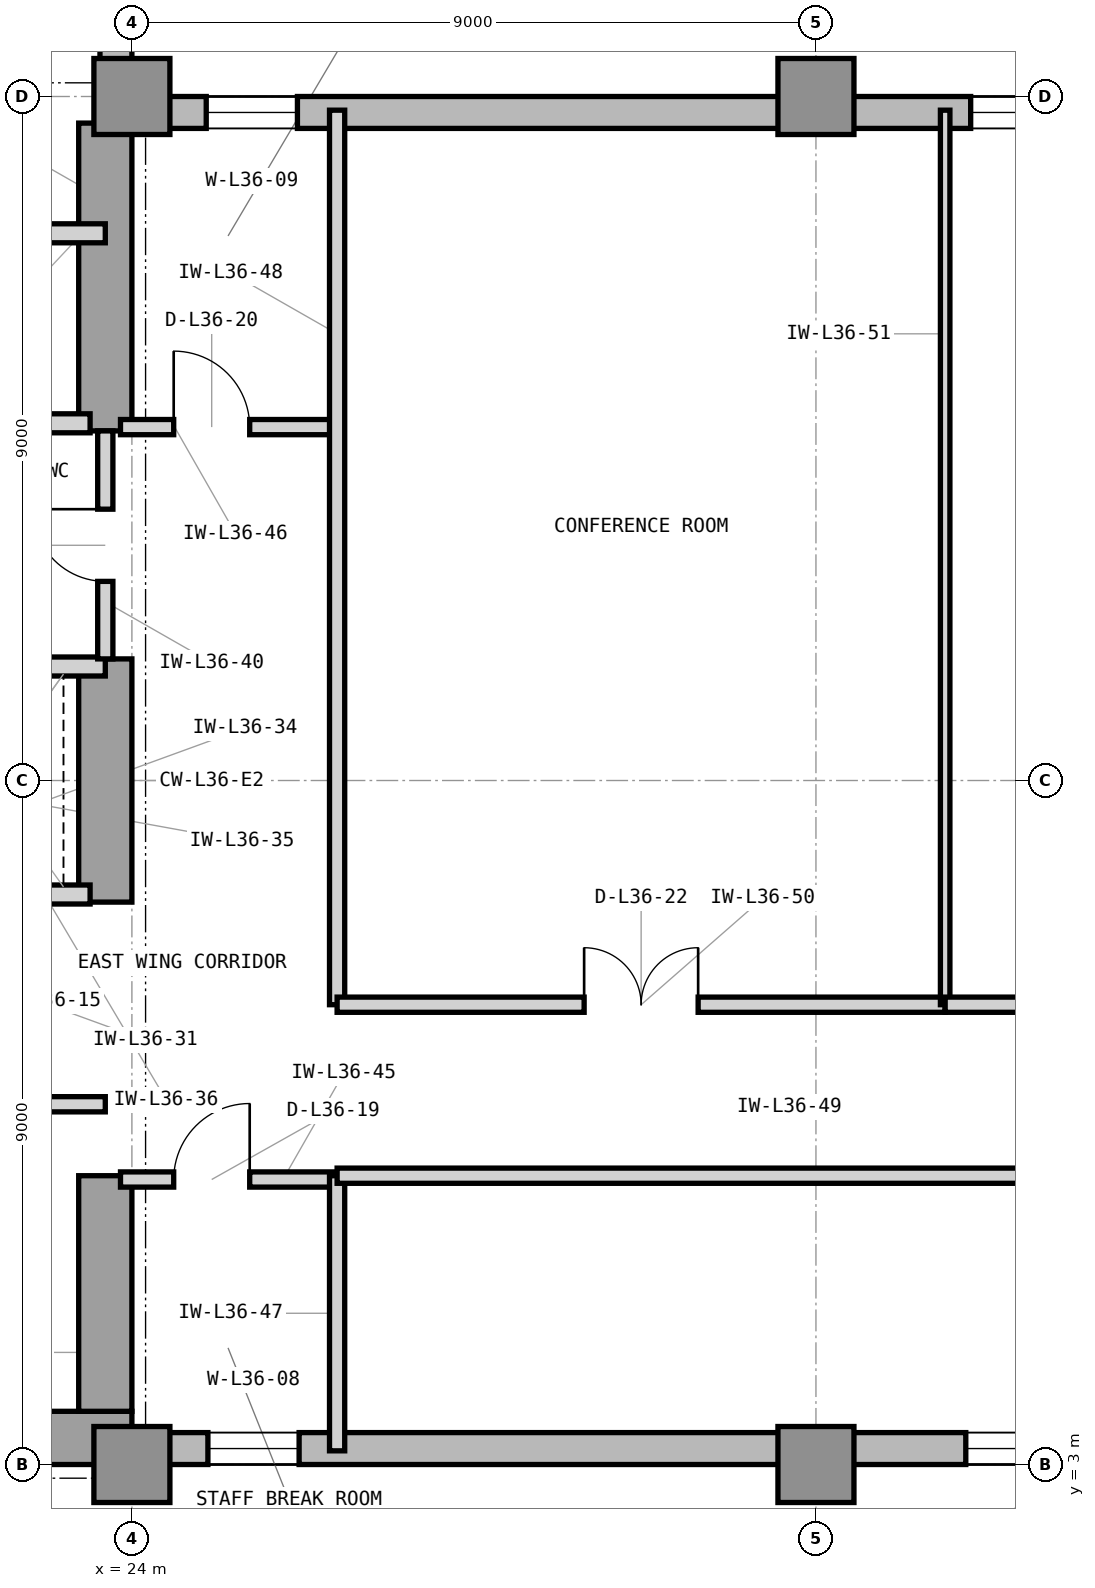
"""IFC4 building model, lengths in metres.
Left out: names, types, materials, properties, quantities, classifications, styles, units other than length and angle.
Written with IfcOpenShell. Run it as: python <this file> out.ifc"""

import sys

from ifc_helpers import new_model, si_unit, direction, frame, frame_2d, origin, origin_2d, place, context, subcontext, project, spatial, rectangle, extrude, element, fill, save


model = new_model("IFC4")
c1 = context("Model", 3, precision=1e-05, world=origin(), true_north=direction((0.0, 1.0)))
c2 = subcontext(c1, "Body", "Model", "MODEL_VIEW")
j1 = project(units=[si_unit("LENGTHUNIT", "METRE"), si_unit("PLANEANGLEUNIT", "RADIAN")], contexts=[c1])
p1 = place(None, origin())
s1 = spatial("IfcSite", under=j1, at=p1, CompositionType="ELEMENT")
p2 = place(p1, origin())
s2 = spatial("IfcBuilding", under=s1, at=p2, CompositionType="ELEMENT")
p3 = place(p2, frame((0.0, 0.0, 151.8)))
s3 = spatial("IfcBuildingStorey", under=s2, at=p3, CompositionType="ELEMENT", Elevation=151.8)
p4 = place(p3, frame((7.475, 3.35, 0.0), z_axis=(0.0, 0.0, 1.0), x_axis=(1.0, 0.0, 0.0)))
e1 = element("IfcWall", 1, at=p4, inside=s3, PredefinedType="SHEAR", context=c2, shape_type="SweptSolid", body=[
    extrude(rectangle(XDim=16.525, YDim=0.7, at=frame_2d((8.262, 0.0))), origin(), (0.0, 0.0, 1.0), 3.9),
])
p5 = place(p3, frame((23.65, 3.7, 0.0), z_axis=(0.0, 0.0, 1.0), x_axis=(0.0, 1.0, 0.0)))
e2 = element("IfcWall", 2, at=p5, inside=s3, PredefinedType="SHEAR", context=c2, shape_type="SweptSolid", body=[
    extrude(rectangle(XDim=3.1, YDim=0.7, at=frame_2d((1.55, 0.0))), origin(), (0.0, 0.0, 1.0), 3.9),
])
p6 = place(p3, frame((23.65, 10.4, 0.0), z_axis=(0.0, 0.0, 1.0), x_axis=(0.0, 1.0, 0.0)))
e3 = element("IfcWall", 3, at=p6, inside=s3, PredefinedType="SHEAR", context=c2, shape_type="SweptSolid", body=[
    extrude(rectangle(XDim=3.2, YDim=0.7, at=frame_2d((1.6, 0.0))), origin(), (0.0, 0.0, 1.0), 3.9),
])
p7 = place(p3, frame((23.65, 16.6, 0.0), z_axis=(0.0, 0.0, 1.0), x_axis=(0.0, 1.0, 0.0)))
e4 = element("IfcWall", 4, at=p7, inside=s3, PredefinedType="SHEAR", context=c2, shape_type="SweptSolid", body=[
    extrude(rectangle(XDim=4.05, YDim=0.7, at=frame_2d((2.025, 0.0))), origin(), (0.0, 0.0, 1.0), 3.9),
])
for number, where, z_axis, x_axis in (
    (5, (24.0, 3.0, 0.0), (0.0, 0.0, 1.0), (1.0, 0.0, 0.0)),
    (6, (24.0, 21.0, 0.0), (0.0, 0.0, 1.0), (1.0, 0.0, 0.0)),
    (7, (33.0, 3.0, 0.0), (0.0, 0.0, 1.0), (1.0, 0.0, 0.0)),
    (8, (33.0, 21.0, 0.0), (0.0, 0.0, 1.0), (1.0, 0.0, 0.0)),
):
    element("IfcColumn", number, at=place(p3, frame(where, z_axis=z_axis, x_axis=x_axis)), inside=s3, PredefinedType="COLUMN", context=c2, shape_type="SweptSolid", body=[
        extrude(rectangle(XDim=1.0, YDim=1.0, at=origin_2d()), origin(), (0.0, 0.0, 1.0), 3.9),
    ])
p8 = place(p3, frame((23.9, 3.21, 0.0), z_axis=(0.0, 0.0, 1.0), x_axis=(1.0, 0.0, 0.0)))
e9 = element("IfcWall", 9, at=p8, inside=s3, PredefinedType="STANDARD", context=c2, shape_type="SweptSolid", body=[
    extrude(rectangle(XDim=34.5, YDim=0.42, at=frame_2d((17.25, 0.0))), origin(), (0.0, 0.0, 1.0), 3.62),
])
p9 = place(p8, frame((11.071, 0.0, 0.85)))
e10 = element("IfcOpeningElement", 10, at=p9, cuts=e9, PredefinedType="OPENING", context=c2, shape_type="SweptSolid", body=[
    extrude(rectangle(XDim=2.5, YDim=2.25, at=frame_2d((1.25, 1.125))), frame((0.0, 0.22, 0.0), z_axis=(0.0, -1.0, 0.0), x_axis=(1.0, 0.0, 0.0)), (0.0, 0.0, 1.0), 0.44),
])
p10 = place(p8, frame((1.1, 0.0, 0.85)))
e11 = element("IfcOpeningElement", 11, at=p10, cuts=e9, PredefinedType="OPENING", context=c2, shape_type="SweptSolid", body=[
    extrude(rectangle(XDim=1.2, YDim=2.25, at=frame_2d((0.6, 1.125))), frame((0.0, 0.22, 0.0), z_axis=(0.0, -1.0, 0.0), x_axis=(1.0, 0.0, 0.0)), (0.0, 0.0, 1.0), 0.44),
])
p11 = place(p3, frame((58.4, 20.79, 0.0), z_axis=(0.0, 0.0, 1.0), x_axis=(-1.0, 0.0, 0.0)))
e12 = element("IfcWall", 12, at=p11, inside=s3, PredefinedType="STANDARD", context=c2, shape_type="SweptSolid", body=[
    extrude(rectangle(XDim=34.4, YDim=0.42, at=frame_2d((17.2, 0.0))), origin(), (0.0, 0.0, 1.0), 3.62),
])
p12 = place(p11, frame((20.864, 0.0, 0.85)))
e13 = element("IfcOpeningElement", 13, at=p12, cuts=e12, PredefinedType="OPENING", context=c2, shape_type="SweptSolid", body=[
    extrude(rectangle(XDim=2.5, YDim=2.25, at=frame_2d((1.25, 1.125))), frame((0.0, 0.22, 0.0), z_axis=(0.0, -1.0, 0.0), x_axis=(1.0, 0.0, 0.0)), (0.0, 0.0, 1.0), 0.44),
])
p13 = place(p11, frame((32.222, 0.0, 0.85)))
e14 = element("IfcOpeningElement", 14, at=p13, cuts=e12, PredefinedType="OPENING", context=c2, shape_type="SweptSolid", body=[
    extrude(rectangle(XDim=1.2, YDim=2.25, at=frame_2d((0.6, 1.125))), frame((0.0, 0.22, 0.0), z_axis=(0.0, -1.0, 0.0), x_axis=(1.0, 0.0, 0.0)), (0.0, 0.0, 1.0), 0.44),
])
p14 = place(p11, frame((11.386, 0.0, 0.85)))
e15 = element("IfcOpeningElement", 15, at=p14, cuts=e12, PredefinedType="OPENING", context=c2, shape_type="SweptSolid", body=[
    extrude(rectangle(XDim=2.5, YDim=2.25, at=frame_2d((1.25, 1.125))), frame((0.0, 0.22, 0.0), z_axis=(0.0, -1.0, 0.0), x_axis=(1.0, 0.0, 0.0)), (0.0, 0.0, 1.0), 0.44),
])
p15 = place(p3, frame((23.79, 21.0, 0.0), z_axis=(0.0, 0.0, 1.0), x_axis=(0.0, 1.0, 0.0)))
e16 = element("IfcWall", 16, at=p15, inside=s3, PredefinedType="STANDARD", context=c2, shape_type="SweptSolid", body=[
    extrude(rectangle(XDim=25.4, YDim=0.42, at=frame_2d((12.7, 0.0))), origin(), (0.0, 0.0, 1.0), 3.62),
])
p16 = place(p15, frame((11.45, 0.0, 0.85)))
e17 = element("IfcOpeningElement", 17, at=p16, cuts=e16, PredefinedType="OPENING", context=c2, shape_type="SweptSolid", body=[
    extrude(rectangle(XDim=2.5, YDim=2.25, at=frame_2d((1.25, 1.125))), frame((0.0, 0.22, 0.0), z_axis=(0.0, -1.0, 0.0), x_axis=(1.0, 0.0, 0.0)), (0.0, 0.0, 1.0), 0.44),
])
p17 = place(p15, frame((15.966, 0.0, 0.85)))
e18 = element("IfcOpeningElement", 18, at=p17, cuts=e16, PredefinedType="OPENING", context=c2, shape_type="SweptSolid", body=[
    extrude(rectangle(XDim=1.2, YDim=2.25, at=frame_2d((0.6, 1.125))), frame((0.0, 0.22, 0.0), z_axis=(0.0, -1.0, 0.0), x_axis=(1.0, 0.0, 0.0)), (0.0, 0.0, 1.0), 0.44),
])
p18 = place(p3, frame((21.05, 16.7, 0.0), z_axis=(0.0, 0.0, 1.0), x_axis=(1.0, 0.0, 0.0)))
e19 = element("IfcWall", 19, at=p18, inside=s3, PredefinedType="PARTITIONING", context=c2, shape_type="SweptSolid", body=[
    extrude(rectangle(XDim=2.4, YDim=0.25, at=frame_2d((1.2, 0.0))), origin(), (0.0, 0.0, 1.0), 3.066),
])
p19 = place(p3, frame((16.45, 19.2, 0.0), z_axis=(0.0, 0.0, 1.0), x_axis=(1.0, 0.0, 0.0)))
e20 = element("IfcWall", 20, at=p19, inside=s3, PredefinedType="PARTITIONING", context=c2, shape_type="SweptSolid", body=[
    extrude(rectangle(XDim=7.2, YDim=0.25, at=frame_2d((3.6, 0.0))), origin(), (0.0, 0.0, 1.0), 3.61),
])
p20 = place(p3, frame((17.5, 7.74, 0.0), z_axis=(0.0, 0.0, 1.0), x_axis=(1.0, 0.0, 0.0)))
e21 = element("IfcWall", 21, at=p20, inside=s3, PredefinedType="PARTITIONING", context=c2, shape_type="SweptSolid", body=[
    extrude(rectangle(XDim=6.15, YDim=0.2, at=frame_2d((3.075, 0.0))), origin(), (0.0, 0.0, 1.0), 3.61),
])
p21 = place(p20, frame((2.575, 0.0, 0.0)))
e22 = element("IfcOpeningElement", 22, at=p21, cuts=e21, PredefinedType="OPENING", context=c2, shape_type="SweptSolid", body=[
    extrude(rectangle(XDim=1.0, YDim=2.15, at=frame_2d((0.5, 1.075))), frame((0.0, 0.11, 0.0), z_axis=(0.0, -1.0, 0.0), x_axis=(1.0, 0.0, 0.0)), (0.0, 0.0, 1.0), 0.22),
])
p22 = place(p3, frame((21.05, 10.5, 0.0), z_axis=(0.0, 0.0, 1.0), x_axis=(1.0, 0.0, 0.0)))
e23 = element("IfcWall", 23, at=p22, inside=s3, PredefinedType="PARTITIONING", context=c2, shape_type="SweptSolid", body=[
    extrude(rectangle(XDim=2.4, YDim=0.25, at=frame_2d((1.2, 0.0))), origin(), (0.0, 0.0, 1.0), 3.066),
])
p23 = place(p22, frame((0.48, 0.0, 0.0)))
e24 = element("IfcOpeningElement", 24, at=p23, cuts=e23, PredefinedType="OPENING", context=c2, shape_type="SweptSolid", body=[
    extrude(rectangle(XDim=1.15, YDim=2.25, at=frame_2d((0.575, 1.125))), frame((0.0, 0.135, 0.0), z_axis=(0.0, -1.0, 0.0), x_axis=(1.0, 0.0, 0.0)), (0.0, 0.0, 1.0), 0.27),
])
p24 = place(p3, frame((14.7, 13.5, 0.0), z_axis=(0.0, 0.0, 1.0), x_axis=(1.0, 0.0, 0.0)))
e25 = element("IfcWall", 25, at=p24, inside=s3, PredefinedType="PARTITIONING", context=c2, shape_type="SweptSolid", body=[
    extrude(rectangle(XDim=8.95, YDim=0.25, at=frame_2d((4.475, 0.0))), origin(), (0.0, 0.0, 1.0), 3.066),
])
p25 = place(p3, frame((23.65, 13.6, 0.0), z_axis=(0.0, 0.0, 1.0), x_axis=(0.0, 1.0, 0.0)))
e26 = element("IfcWall", 26, at=p25, inside=s3, PredefinedType="PARTITIONING", context=c2, shape_type="SweptSolid", body=[
    extrude(rectangle(XDim=3.0, YDim=0.2, at=frame_2d((1.5, 0.0))), origin(), (0.0, 0.0, 1.0), 3.61),
])
p26 = place(p25, frame((1.02, 0.0, 0.0)))
e27 = element("IfcOpeningElement", 27, at=p26, cuts=e26, PredefinedType="OPENING", context=c2, shape_type="SweptSolid", body=[
    extrude(rectangle(XDim=0.95, YDim=2.1, at=frame_2d((0.475, 1.05))), frame((0.0, 0.11, 0.0), z_axis=(0.0, -1.0, 0.0), x_axis=(1.0, 0.0, 0.0)), (0.0, 0.0, 1.0), 0.22),
])
p27 = place(p3, frame((23.85, 6.75, 0.0), z_axis=(0.0, 0.0, 1.0), x_axis=(1.0, 0.0, 0.0)))
e28 = element("IfcWall", 28, at=p27, inside=s3, PredefinedType="PARTITIONING", context=c2, shape_type="SweptSolid", body=[
    extrude(rectangle(XDim=2.85, YDim=0.2, at=frame_2d((1.425, 0.0))), origin(), (0.0, 0.0, 1.0), 3.61),
])
p28 = place(p27, frame((0.7, 0.0, 0.0)))
e29 = element("IfcOpeningElement", 29, at=p28, cuts=e28, PredefinedType="OPENING", context=c2, shape_type="SweptSolid", body=[
    extrude(rectangle(XDim=1.0, YDim=2.15, at=frame_2d((0.5, 1.075))), frame((0.0, 0.11, 0.0), z_axis=(0.0, -1.0, 0.0), x_axis=(1.0, 0.0, 0.0)), (0.0, 0.0, 1.0), 0.22),
])
p29 = place(p3, frame((23.85, 16.65, 0.0), z_axis=(0.0, 0.0, 1.0), x_axis=(1.0, 0.0, 0.0)))
e30 = element("IfcWall", 30, at=p29, inside=s3, PredefinedType="PARTITIONING", context=c2, shape_type="SweptSolid", body=[
    extrude(rectangle(XDim=2.85, YDim=0.2, at=frame_2d((1.425, 0.0))), origin(), (0.0, 0.0, 1.0), 3.61),
])
p30 = place(p29, frame((0.7, 0.0, 0.0)))
e31 = element("IfcOpeningElement", 31, at=p30, cuts=e30, PredefinedType="OPENING", context=c2, shape_type="SweptSolid", body=[
    extrude(rectangle(XDim=1.0, YDim=2.15, at=frame_2d((0.5, 1.075))), frame((0.0, 0.11, 0.0), z_axis=(0.0, -1.0, 0.0), x_axis=(1.0, 0.0, 0.0)), (0.0, 0.0, 1.0), 0.22),
])
p31 = place(p3, frame((26.7, 3.18, 0.0), z_axis=(0.0, 0.0, 1.0), x_axis=(0.0, 1.0, 0.0)))
e32 = element("IfcWall", 32, at=p31, inside=s3, PredefinedType="PARTITIONING", context=c2, shape_type="SweptSolid", body=[
    extrude(rectangle(XDim=3.62, YDim=0.2, at=frame_2d((1.81, 0.0))), origin(), (0.0, 0.0, 1.0), 3.61),
])
p32 = place(p3, frame((26.7, 9.05, 0.0), z_axis=(0.0, 0.0, 1.0), x_axis=(0.0, 1.0, 0.0)))
e33 = element("IfcWall", 33, at=p32, inside=s3, PredefinedType="PARTITIONING", context=c2, shape_type="SweptSolid", body=[
    extrude(rectangle(XDim=11.77, YDim=0.2, at=frame_2d((5.885, 0.0))), origin(), (0.0, 0.0, 1.0), 3.61),
])
p33 = place(p3, frame((26.7, 6.8, 0.0), z_axis=(0.0, 0.0, 1.0), x_axis=(1.0, 0.0, 0.0)))
e34 = element("IfcWall", 34, at=p33, inside=s3, PredefinedType="PARTITIONING", context=c2, shape_type="SweptSolid", body=[
    extrude(rectangle(XDim=23.8, YDim=0.2, at=frame_2d((11.9, 0.0))), origin(), (0.0, 0.0, 1.0), 3.61),
])
p34 = place(p33, frame((11.4, 0.0, 0.0)))
e35 = element("IfcOpeningElement", 35, at=p34, cuts=e34, PredefinedType="OPENING", context=c2, shape_type="SweptSolid", body=[
    extrude(rectangle(XDim=1.0, YDim=2.15, at=frame_2d((0.5, 1.075))), frame((0.0, 0.11, 0.0), z_axis=(0.0, -1.0, 0.0), x_axis=(1.0, 0.0, 0.0)), (0.0, 0.0, 1.0), 0.22),
])
p35 = place(p3, frame((26.7, 9.05, 0.0), z_axis=(0.0, 0.0, 1.0), x_axis=(1.0, 0.0, 0.0)))
e36 = element("IfcWall", 36, at=p35, inside=s3, PredefinedType="PARTITIONING", context=c2, shape_type="SweptSolid", body=[
    extrude(rectangle(XDim=8.0, YDim=0.2, at=frame_2d((4.0, 0.0))), origin(), (0.0, 0.0, 1.0), 3.066),
])
p36 = place(p35, frame((3.25, 0.0, 0.0)))
e37 = element("IfcOpeningElement", 37, at=p36, cuts=e36, PredefinedType="OPENING", context=c2, shape_type="SweptSolid", body=[
    extrude(rectangle(XDim=1.5, YDim=2.3, at=frame_2d((0.75, 1.15))), frame((0.0, 0.11, 0.0), z_axis=(0.0, -1.0, 0.0), x_axis=(1.0, 0.0, 0.0)), (0.0, 0.0, 1.0), 0.22),
])
p37 = place(p3, frame((34.7, 9.05, 0.0), z_axis=(0.0, 0.0, 1.0), x_axis=(0.0, 1.0, 0.0)))
e38 = element("IfcWall", 38, at=p37, inside=s3, PredefinedType="PARTITIONING", context=c2, shape_type="SweptSolid", body=[
    extrude(rectangle(XDim=11.77, YDim=0.125, at=frame_2d((5.885, 0.0))), origin(), (0.0, 0.0, 1.0), 3.61),
])
p38 = place(p3, frame((34.7, 9.05, 0.0), z_axis=(0.0, 0.0, 1.0), x_axis=(1.0, 0.0, 0.0)))
e39 = element("IfcWall", 39, at=p38, inside=s3, PredefinedType="PARTITIONING", context=c2, shape_type="SweptSolid", body=[
    extrude(rectangle(XDim=8.5, YDim=0.2, at=frame_2d((4.25, 0.0))), origin(), (0.0, 0.0, 1.0), 3.066),
])
p39 = place(p38, frame((3.75, 0.0, 0.0)))
e40 = element("IfcOpeningElement", 40, at=p39, cuts=e39, PredefinedType="OPENING", context=c2, shape_type="SweptSolid", body=[
    extrude(rectangle(XDim=1.0, YDim=2.15, at=frame_2d((0.5, 1.075))), frame((0.0, 0.11, 0.0), z_axis=(0.0, -1.0, 0.0), x_axis=(1.0, 0.0, 0.0)), (0.0, 0.0, 1.0), 0.22),
])
p40 = place(p9, origin())
e41 = element("IfcWindow", 41, at=p40, inside=s3, PartitioningType="SINGLE_PANEL", PredefinedType="WINDOW", context=c2, shape_type="SweptSolid", body=[
    extrude(rectangle(XDim=2.5, YDim=2.25, at=frame_2d((1.25, 1.125))), frame((0.0, 0.11, 0.0), z_axis=(0.0, -1.0, 0.0), x_axis=(1.0, 0.0, 0.0)), (0.0, 0.0, 1.0), 0.06),
])
fill(e10, e41)
p41 = place(p12, origin())
e42 = element("IfcWindow", 42, at=p41, inside=s3, PartitioningType="SINGLE_PANEL", PredefinedType="WINDOW", context=c2, shape_type="SweptSolid", body=[
    extrude(rectangle(XDim=2.5, YDim=2.25, at=frame_2d((1.25, 1.125))), frame((0.0, 0.11, 0.0), z_axis=(0.0, -1.0, 0.0), x_axis=(1.0, 0.0, 0.0)), (0.0, 0.0, 1.0), 0.06),
])
fill(e13, e42)
p42 = place(p26, origin())
e43 = element("IfcDoor", 43, at=p42, inside=s3, OperationType="SINGLE_SWING_RIGHT", PredefinedType="DOOR", context=c2, shape_type="SweptSolid", body=[
    extrude(rectangle(XDim=0.95, YDim=2.1, at=frame_2d((0.475, 1.05))), frame((0.0, 0.025, 0.0), z_axis=(0.0, -1.0, 0.0), x_axis=(1.0, 0.0, 0.0)), (0.0, 0.0, 1.0), 0.05),
])
fill(e27, e43)
p43 = place(p28, origin())
e44 = element("IfcDoor", 44, at=p43, inside=s3, OperationType="SINGLE_SWING_RIGHT", PredefinedType="DOOR", context=c2, shape_type="SweptSolid", body=[
    extrude(rectangle(XDim=1.0, YDim=2.15, at=frame_2d((0.5, 1.075))), frame((0.0, 0.025, 0.0), z_axis=(0.0, -1.0, 0.0), x_axis=(1.0, 0.0, 0.0)), (0.0, 0.0, 1.0), 0.05),
])
fill(e29, e44)
p44 = place(p30, origin())
e45 = element("IfcDoor", 45, at=p44, inside=s3, OperationType="SINGLE_SWING_LEFT", PredefinedType="DOOR", context=c2, shape_type="SweptSolid", body=[
    extrude(rectangle(XDim=1.0, YDim=2.15, at=frame_2d((0.5, 1.075))), frame((0.0, 0.025, 0.0), z_axis=(0.0, -1.0, 0.0), x_axis=(1.0, 0.0, 0.0)), (0.0, 0.0, 1.0), 0.05),
])
fill(e31, e45)
p45 = place(p36, origin())
e46 = element("IfcDoor", 46, at=p45, inside=s3, OperationType="DOUBLE_DOOR_SINGLE_SWING", PredefinedType="DOOR", context=c2, shape_type="SweptSolid", body=[
    extrude(rectangle(XDim=1.5, YDim=2.3, at=frame_2d((0.75, 1.15))), frame((0.0, 0.025, 0.0), z_axis=(0.0, -1.0, 0.0), x_axis=(1.0, 0.0, 0.0)), (0.0, 0.0, 1.0), 0.05),
])
fill(e37, e46)
p46 = place(p10, origin())
e47 = element("IfcWindow", 47, at=p46, inside=s3, PartitioningType="SINGLE_PANEL", PredefinedType="WINDOW", context=c2, shape_type="SweptSolid", body=[
    extrude(rectangle(XDim=1.2, YDim=2.25, at=frame_2d((0.6, 1.125))), frame((0.0, 0.11, 0.0), z_axis=(0.0, -1.0, 0.0), x_axis=(1.0, 0.0, 0.0)), (0.0, 0.0, 1.0), 0.06),
])
fill(e11, e47)
p47 = place(p13, origin())
e48 = element("IfcWindow", 48, at=p47, inside=s3, PartitioningType="SINGLE_PANEL", PredefinedType="WINDOW", context=c2, shape_type="SweptSolid", body=[
    extrude(rectangle(XDim=1.2, YDim=2.25, at=frame_2d((0.6, 1.125))), frame((0.0, 0.11, 0.0), z_axis=(0.0, -1.0, 0.0), x_axis=(1.0, 0.0, 0.0)), (0.0, 0.0, 1.0), 0.06),
])
fill(e14, e48)
save(model, sys.argv[1])
